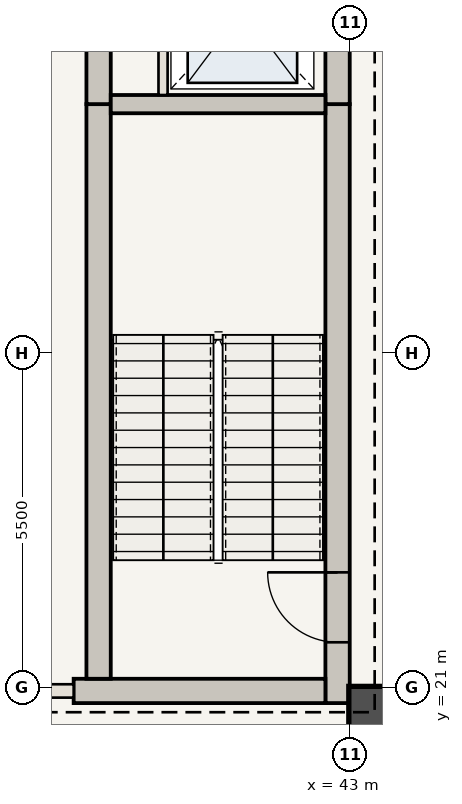
"""IFC4 building model, lengths in metres.
Left out: names, types, materials, properties, quantities, classifications, styles, units other than length and angle.
Written with IfcOpenShell. Run it as: python <this file> out.ifc"""

import sys

from ifc_helpers import new_model, si_unit, direction, frame, frame_2d, origin, origin_2d, place, context, subcontext, project, spatial, rectangle, extrude, element, fill, save


model = new_model("IFC4")
c1 = context("Model", 3, precision=1e-05, world=origin(), true_north=direction((0.0, 1.0)))
c2 = subcontext(c1, "Body", "Model", "MODEL_VIEW")
j1 = project(units=[si_unit("LENGTHUNIT", "METRE"), si_unit("PLANEANGLEUNIT", "RADIAN")], contexts=[c1])
p1 = place(None, origin())
s1 = spatial("IfcSite", under=j1, at=p1, CompositionType="ELEMENT")
p2 = place(p1, origin())
s2 = spatial("IfcBuilding", under=s1, at=p2, CompositionType="ELEMENT")
p3 = place(p2, frame((0.0, 0.0, 308.35)))
s3 = spatial("IfcBuildingStorey", under=s2, at=p3, CompositionType="ELEMENT", Elevation=308.35)
p4 = place(p3, frame((42.79, 20.75, 0.0), z_axis=(0.0, 0.0, 1.0), x_axis=(0.0, 1.0, 0.0)))
e1 = element("IfcWall", 1, at=p4, inside=s3, PredefinedType="SHEAR", context=c2, shape_type="SweptSolid", body=[
    extrude(rectangle(XDim=9.85, YDim=0.4, at=frame_2d((4.925, 0.0))), origin(), (0.0, 0.0, 1.0), 4.9),
])
p5 = place(p4, frame((1.0, 0.0, 0.0)))
e2 = element("IfcOpeningElement", 2, at=p5, cuts=e1, PredefinedType="OPENING", context=c2, shape_type="SweptSolid", body=[
    extrude(rectangle(XDim=1.15, YDim=2.15, at=frame_2d((0.575, 1.075))), frame((0.0, 0.21, 0.0), z_axis=(0.0, -1.0, 0.0), x_axis=(1.0, 0.0, 0.0)), (0.0, 0.0, 1.0), 0.42),
])
p6 = place(p3, frame((42.79, 30.6, 0.0), z_axis=(0.0, 0.0, 1.0), x_axis=(0.0, 1.0, 0.0)))
e3 = element("IfcWall", 3, at=p6, inside=s3, PredefinedType="SHEAR", context=c2, shape_type="SweptSolid", body=[
    extrude(rectangle(XDim=12.6, YDim=0.4, at=frame_2d((6.3, 0.0))), origin(), (0.0, 0.0, 1.0), 4.9),
])
p7 = place(p6, frame((4.2, 0.0, 0.0)))
e4 = element("IfcOpeningElement", 4, at=p7, cuts=e3, PredefinedType="OPENING", context=c2, shape_type="SweptSolid", body=[
    extrude(rectangle(XDim=1.1, YDim=2.15, at=frame_2d((0.55, 1.075))), frame((0.0, 0.21, 0.0), z_axis=(0.0, -1.0, 0.0), x_axis=(1.0, 0.0, 0.0)), (0.0, 0.0, 1.0), 0.42),
])
p8 = place(p6, frame((8.4, 0.0, 0.0)))
e5 = element("IfcOpeningElement", 5, at=p8, cuts=e3, PredefinedType="OPENING", context=c2, shape_type="SweptSolid", body=[
    extrude(rectangle(XDim=0.88, YDim=2.1, at=frame_2d((0.44, 1.05))), frame((0.0, 0.21, 0.0), z_axis=(0.0, -1.0, 0.0), x_axis=(1.0, 0.0, 0.0)), (0.0, 0.0, 1.0), 0.42),
])
p9 = place(p6, frame((10.5, 0.0, 0.0)))
e6 = element("IfcOpeningElement", 6, at=p9, cuts=e3, PredefinedType="OPENING", context=c2, shape_type="SweptSolid", body=[
    extrude(rectangle(XDim=0.88, YDim=2.1, at=frame_2d((0.44, 1.05))), frame((0.0, 0.21, 0.0), z_axis=(0.0, -1.0, 0.0), x_axis=(1.0, 0.0, 0.0)), (0.0, 0.0, 1.0), 0.42),
])
p10 = place(p3, frame((38.45, 20.95, 0.0), z_axis=(0.0, 0.0, 1.0), x_axis=(1.0, 0.0, 0.0)))
e7 = element("IfcWall", 7, at=p10, inside=s3, PredefinedType="SHEAR", context=c2, shape_type="SweptSolid", body=[
    extrude(rectangle(XDim=4.14, YDim=0.4, at=frame_2d((2.07, 0.0))), origin(), (0.0, 0.0, 1.0), 4.9),
])
p11 = place(p3, frame((38.86, 21.15, 0.0), z_axis=(0.0, 0.0, 1.0), x_axis=(0.0, 1.0, 0.0)))
e8 = element("IfcWall", 8, at=p11, inside=s3, PredefinedType="SHEAR", context=c2, shape_type="SweptSolid", body=[
    extrude(rectangle(XDim=9.45, YDim=0.4, at=frame_2d((4.725, 0.0))), origin(), (0.0, 0.0, 1.0), 4.9),
])
p12 = place(p3, frame((38.86, 30.6, 0.0), z_axis=(0.0, 0.0, 1.0), x_axis=(0.0, 1.0, 0.0)))
e9 = element("IfcWall", 9, at=p12, inside=s3, PredefinedType="SHEAR", context=c2, shape_type="SweptSolid", body=[
    extrude(rectangle(XDim=12.2, YDim=0.4, at=frame_2d((6.1, 0.0))), origin(), (0.0, 0.0, 1.0), 4.9),
])
p13 = place(p3, frame((43.35, 20.65, 0.0), z_axis=(0.0, 0.0, 1.0), x_axis=(1.0, 0.0, 0.0)))
e10 = element("IfcColumn", 10, at=p13, inside=s3, PredefinedType="COLUMN", context=c2, shape_type="SweptSolid", body=[
    extrude(rectangle(XDim=0.75, YDim=0.75, at=origin_2d()), origin(), (0.0, 0.0, 1.0), 4.9),
])
p14 = place(p3, frame((39.06, 30.6, 0.0), z_axis=(0.0, 0.0, 1.0), x_axis=(1.0, 0.0, 0.0)))
e11 = element("IfcWall", 11, at=p14, inside=s3, PredefinedType="SHEAR", context=c2, shape_type="SweptSolid", body=[
    extrude(rectangle(XDim=3.53, YDim=0.3, at=frame_2d((1.765, 0.0))), origin(), (0.0, 0.0, 1.0), 4.64),
])
p15 = place(p3, frame((39.92, 30.75, 0.0), z_axis=(0.0, 0.0, 1.0), x_axis=(0.0, 1.0, 0.0)))
e12 = element("IfcWall", 12, at=p15, inside=s3, PredefinedType="STANDARD", context=c2, shape_type="SweptSolid", body=[
    extrude(rectangle(XDim=2.65, YDim=0.15, at=frame_2d((1.325, 0.0))), origin(), (0.0, 0.0, 1.0), 4.64),
])
p16 = place(p3, frame((35.15, 20.95, 0.0), z_axis=(0.0, 0.0, 1.0), x_axis=(1.0, 0.0, 0.0)))
e13 = element("IfcWall", 13, at=p16, inside=s3, PredefinedType="STANDARD", context=c2, shape_type="SweptSolid", body=[
    extrude(rectangle(XDim=3.3, YDim=0.22, at=frame_2d((1.65, 0.0))), origin(), (0.0, 0.0, 1.0), 4.64),
])
p17 = place(p16, frame((1.1, 0.0, 0.0)))
e14 = element("IfcOpeningElement", 14, at=p17, cuts=e13, PredefinedType="OPENING", context=c2, shape_type="SweptSolid", body=[
    extrude(rectangle(XDim=1.1, YDim=2.15, at=frame_2d((0.55, 1.075))), frame((0.0, 0.12, 0.0), z_axis=(0.0, -1.0, 0.0), x_axis=(1.0, 0.0, 0.0)), (0.0, 0.0, 1.0), 0.24),
])
p18 = place(p5, origin())
e15 = element("IfcDoor", 15, at=p18, inside=s3, OperationType="SINGLE_SWING_RIGHT", PredefinedType="DOOR", context=c2, shape_type="SweptSolid", body=[
    extrude(rectangle(XDim=1.15, YDim=2.15, at=frame_2d((0.575, 1.075))), frame((0.0, 0.025, 0.0), z_axis=(0.0, -1.0, 0.0), x_axis=(1.0, 0.0, 0.0)), (0.0, 0.0, 1.0), 0.05),
])
fill(e2, e15)
save(model, sys.argv[1])
